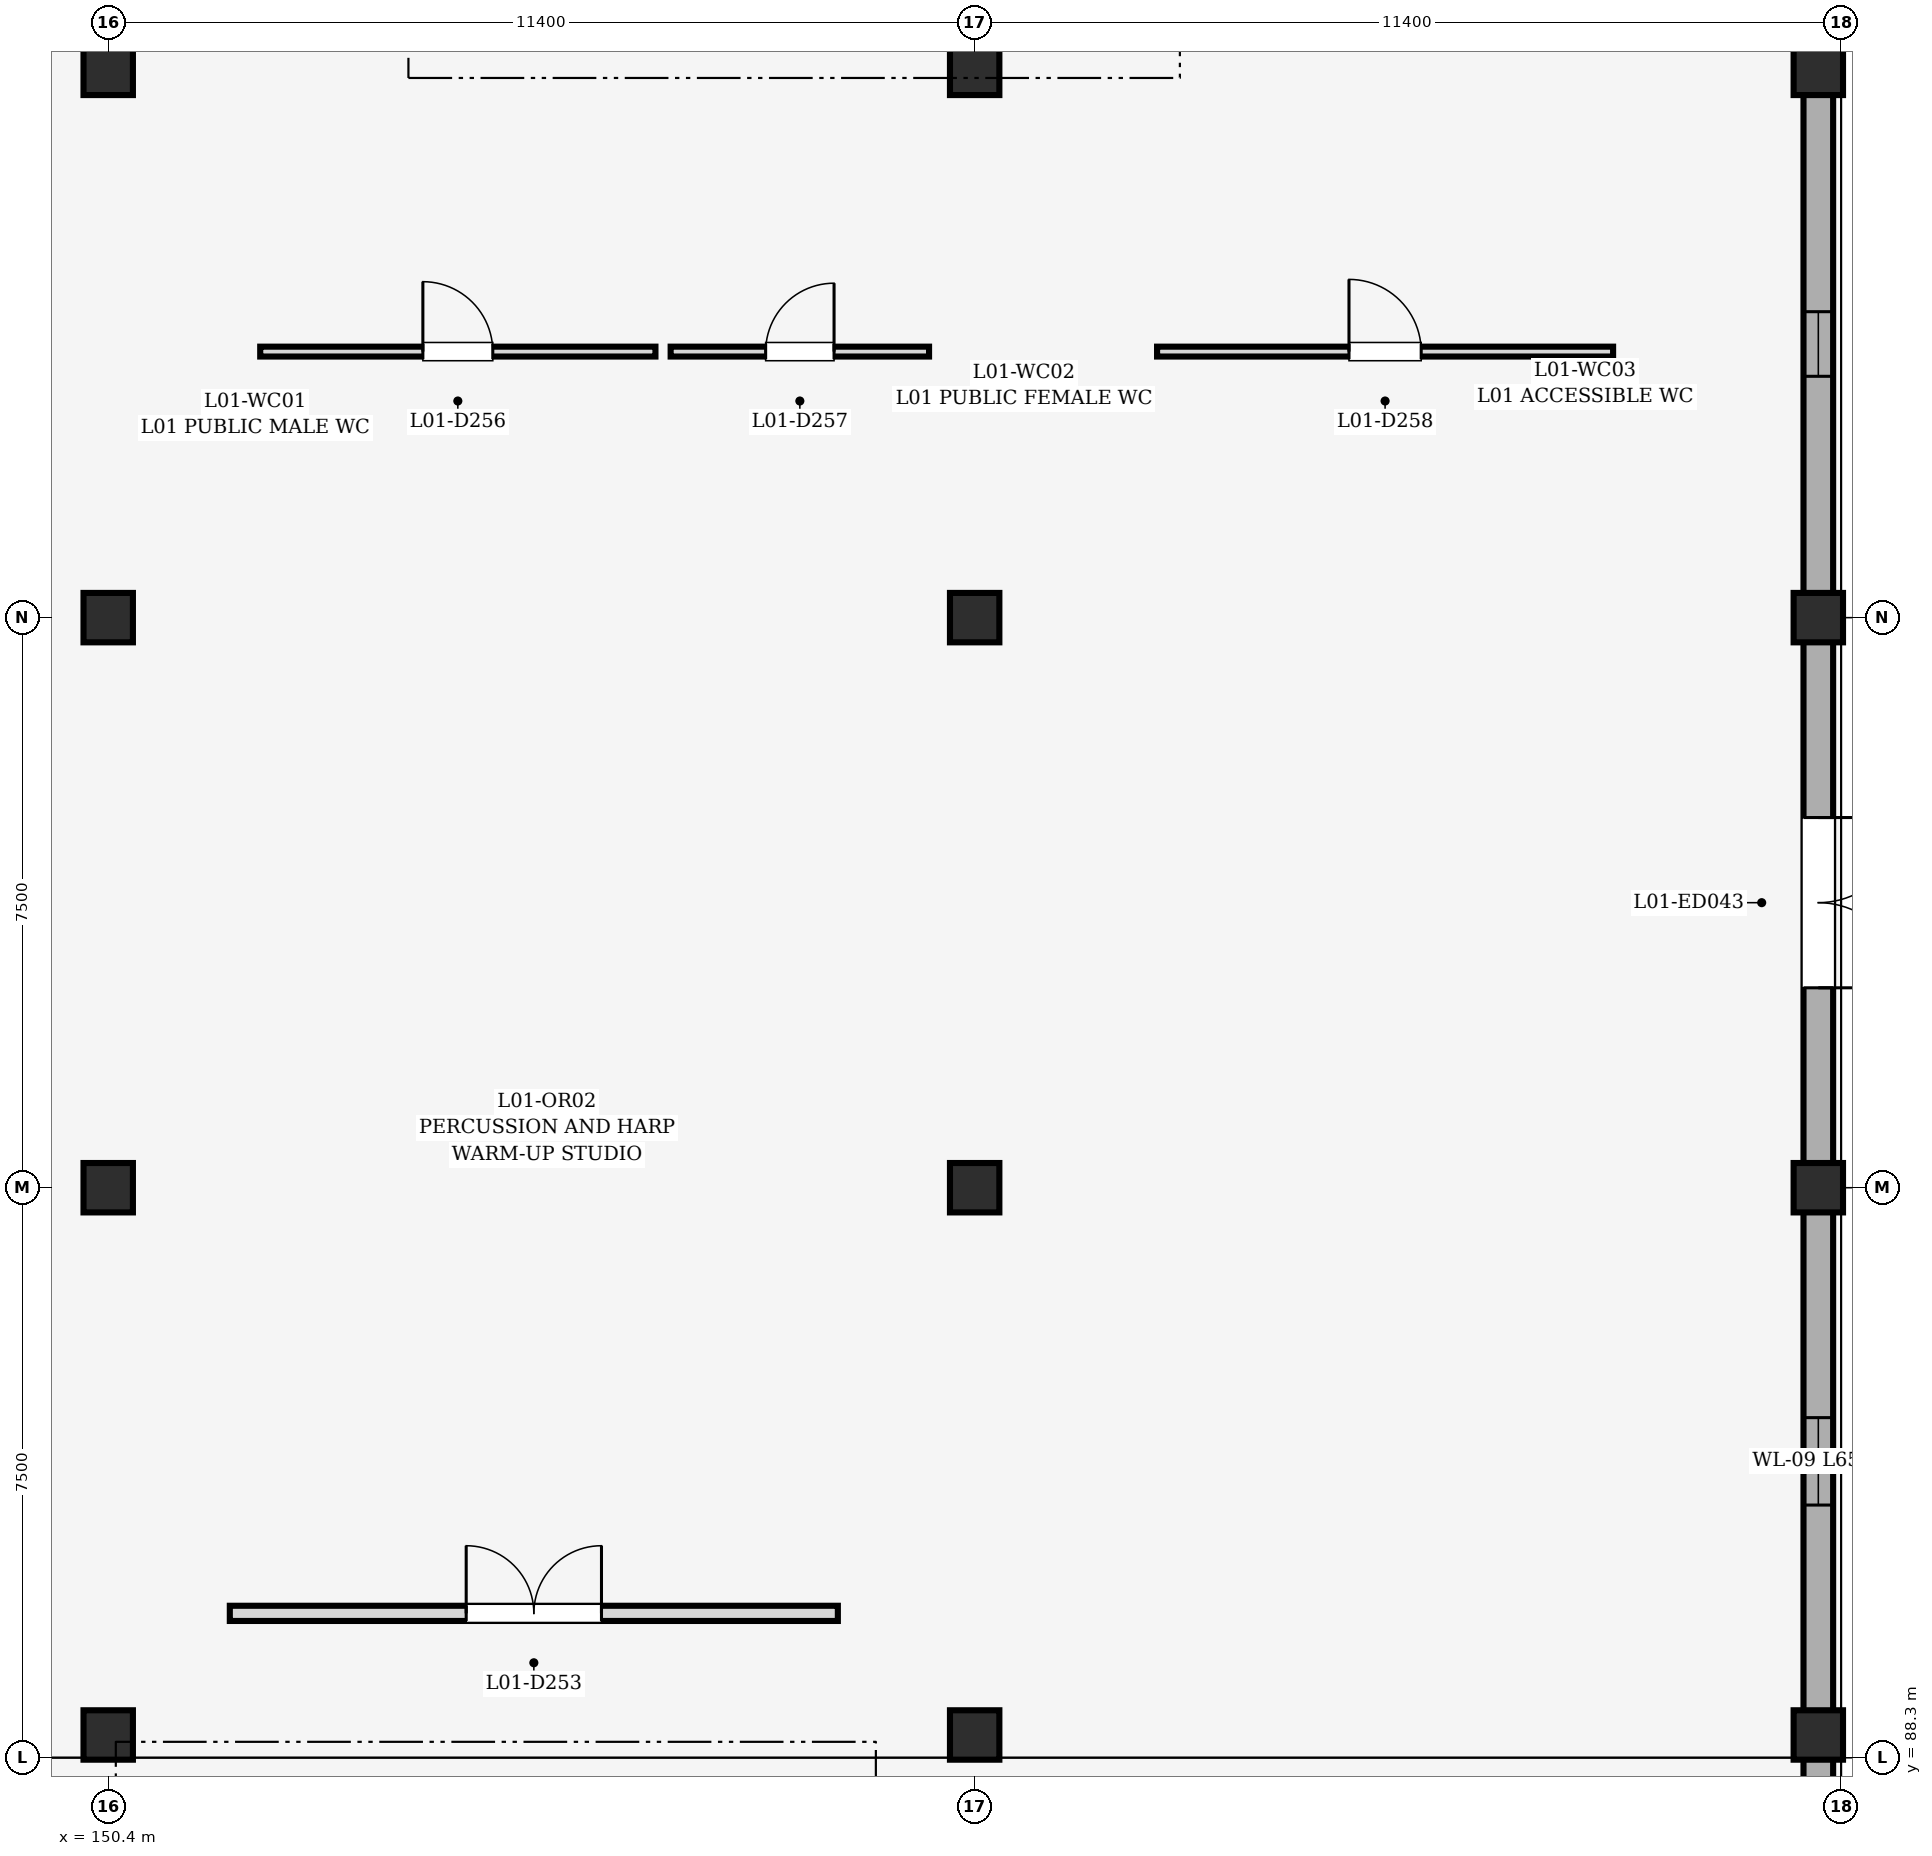
"""IFC4 building model, lengths in metres.
Left out: names, types, materials, properties, quantities, classifications, styles, units other than length and angle.
Written with IfcOpenShell. Run it as: python <this file> out.ifc"""

import sys

from ifc_helpers import new_model, si_unit, direction, frame, frame_2d, origin, origin_2d, place, context, subcontext, project, spatial, rectangle, extrude, element, fill, save


model = new_model("IFC4")
c1 = context("Model", 3, precision=1e-05, world=origin(), true_north=direction((0.0, 1.0)))
c2 = subcontext(c1, "Body", "Model", "MODEL_VIEW")
j1 = project(units=[si_unit("LENGTHUNIT", "METRE"), si_unit("PLANEANGLEUNIT", "RADIAN")], contexts=[c1])
p1 = place(None, origin())
s1 = spatial("IfcSite", under=j1, at=p1, CompositionType="ELEMENT")
p2 = place(p1, origin())
s2 = spatial("IfcBuilding", under=s1, at=p2, CompositionType="ELEMENT")
p3 = place(p2, origin())
s3 = spatial("IfcBuildingStorey", under=s2, at=p3, CompositionType="ELEMENT", Elevation=0.0)
for number, where, z_axis, x_axis in (
    (1, (150.4, 88.6, 0.0), (0.0, 0.0, 1.0), (1.0, 0.0, 0.0)),
    (2, (150.4, 95.8, 0.0), (0.0, 0.0, 1.0), (1.0, 0.0, 0.0)),
    (3, (150.4, 103.3, 0.0), (0.0, 0.0, 1.0), (1.0, 0.0, 0.0)),
    (4, (150.4, 110.5, 0.0), (0.0, 0.0, 1.0), (1.0, 0.0, 0.0)),
    (5, (161.8, 88.6, 0.0), (0.0, 0.0, 1.0), (1.0, 0.0, 0.0)),
    (6, (161.8, 95.8, 0.0), (0.0, 0.0, 1.0), (1.0, 0.0, 0.0)),
    (7, (161.8, 103.3, 0.0), (0.0, 0.0, 1.0), (1.0, 0.0, 0.0)),
    (8, (161.8, 110.5, 0.0), (0.0, 0.0, 1.0), (1.0, 0.0, 0.0)),
    (9, (172.9, 88.6, 0.0), (0.0, 0.0, 1.0), (1.0, 0.0, 0.0)),
    (10, (172.9, 95.8, 0.0), (0.0, 0.0, 1.0), (1.0, 0.0, 0.0)),
    (11, (172.9, 103.3, 0.0), (0.0, 0.0, 1.0), (1.0, 0.0, 0.0)),
    (12, (172.9, 110.5, 0.0), (0.0, 0.0, 1.0), (1.0, 0.0, 0.0)),
):
    element("IfcColumn", number, at=place(p3, frame(where, z_axis=z_axis, x_axis=x_axis)), inside=s3, PredefinedType="COLUMN", context=c2, shape_type="SweptSolid", body=[
        extrude(rectangle(XDim=0.65, YDim=0.65, at=origin_2d()), origin(), (0.0, 0.0, 1.0), 5.4),
    ])
p4 = place(p3, frame((172.9, 95.49, 0.0), z_axis=(0.0, 0.0, 1.0), x_axis=(0.0, -1.0, 0.0)))
e13 = element("IfcWall", 13, at=p4, inside=s3, PredefinedType="STANDARD", context=c2, shape_type="SweptSolid", body=[
    extrude(rectangle(XDim=6.58, YDim=0.39, at=frame_2d((3.29, 0.0))), origin(), (0.0, 0.0, 1.0), 4.6),
])
p5 = place(p4, frame((2.715, 0.0, 0.85)))
e14 = element("IfcOpeningElement", 14, at=p5, cuts=e13, PredefinedType="OPENING", context=c2, shape_type="SweptSolid", body=[
    extrude(rectangle(XDim=1.15, YDim=2.2, at=frame_2d((0.575, 1.1))), frame((0.0, 0.207, 0.0), z_axis=(0.0, -1.0, 0.0), x_axis=(1.0, 0.0, 0.0)), (0.0, 0.0, 1.0), 0.414),
])
p6 = place(p3, frame((172.9, 102.99, 0.0), z_axis=(0.0, 0.0, 1.0), x_axis=(0.0, -1.0, 0.0)))
e15 = element("IfcWall", 15, at=p6, inside=s3, PredefinedType="STANDARD", context=c2, shape_type="SweptSolid", body=[
    extrude(rectangle(XDim=6.88, YDim=0.39, at=frame_2d((3.44, 0.0))), origin(), (0.0, 0.0, 1.0), 4.357),
])
p7 = place(p6, frame((2.32, 0.0, 0.0)))
e16 = element("IfcOpeningElement", 16, at=p7, cuts=e15, PredefinedType="OPENING", context=c2, shape_type="SweptSolid", body=[
    extrude(rectangle(XDim=2.24, YDim=2.35, at=frame_2d((1.12, 1.175))), frame((0.0, 0.207, 0.0), z_axis=(0.0, -1.0, 0.0), x_axis=(1.0, 0.0, 0.0)), (0.0, 0.0, 1.0), 0.414),
])
p8 = place(p3, frame((172.9, 110.19, 0.0), z_axis=(0.0, 0.0, 1.0), x_axis=(0.0, -1.0, 0.0)))
e17 = element("IfcWall", 17, at=p8, inside=s3, PredefinedType="STANDARD", context=c2, shape_type="SweptSolid", body=[
    extrude(rectangle(XDim=6.58, YDim=0.39, at=frame_2d((3.29, 0.0))), origin(), (0.0, 0.0, 1.0), 4.407),
])
p9 = place(p8, frame((2.865, 0.0, 0.85)))
e18 = element("IfcOpeningElement", 18, at=p9, cuts=e17, PredefinedType="OPENING", context=c2, shape_type="SweptSolid", body=[
    extrude(rectangle(XDim=0.85, YDim=1.95, at=frame_2d((0.425, 0.975))), frame((0.0, 0.207, 0.0), z_axis=(0.0, -1.0, 0.0), x_axis=(1.0, 0.0, 0.0)), (0.0, 0.0, 1.0), 0.414),
])
p10 = place(p3, frame((172.9, 88.29, 0.0), z_axis=(0.0, 0.0, 1.0), x_axis=(0.0, -1.0, 0.0)))
e19 = element("IfcWall", 19, at=p10, inside=s3, PredefinedType="STANDARD", context=c2, shape_type="SweptSolid", body=[
    extrude(rectangle(XDim=7.205, YDim=0.39, at=frame_2d((3.603, 0.0))), origin(), (0.0, 0.0, 1.0), 4.579),
])
p11 = place(p10, frame((2.482, 0.0, 0.0)))
e20 = element("IfcOpeningElement", 20, at=p11, cuts=e19, PredefinedType="OPENING", context=c2, shape_type="SweptSolid", body=[
    extrude(rectangle(XDim=2.24, YDim=2.35, at=frame_2d((1.12, 1.175))), frame((0.0, 0.207, 0.0), z_axis=(0.0, -1.0, 0.0), x_axis=(1.0, 0.0, 0.0)), (0.0, 0.0, 1.0), 0.414),
])
p12 = place(p3, frame((152.0, 90.2, 0.0), z_axis=(0.0, 0.0, 1.0), x_axis=(1.0, 0.0, 0.0)))
e21 = element("IfcWall", 21, at=p12, inside=s3, PredefinedType="PARTITIONING", context=c2, shape_type="SweptSolid", body=[
    extrude(rectangle(XDim=8.0, YDim=0.2, at=frame_2d((4.0, 0.0))), origin(), (0.0, 0.0, 1.0), 5.105),
])
p13 = place(p12, frame((3.11, 0.0, 0.0)))
e22 = element("IfcOpeningElement", 22, at=p13, cuts=e21, PredefinedType="OPENING", context=c2, shape_type="SweptSolid", body=[
    extrude(rectangle(XDim=1.78, YDim=2.28, at=frame_2d((0.89, 1.14))), frame((0.0, 0.112, 0.0), z_axis=(0.0, -1.0, 0.0), x_axis=(1.0, 0.0, 0.0)), (0.0, 0.0, 1.0), 0.224),
])
p14 = place(p3, frame((152.4, 106.8, 0.0), z_axis=(0.0, 0.0, 1.0), x_axis=(1.0, 0.0, 0.0)))
e23 = element("IfcWall", 23, at=p14, inside=s3, PredefinedType="PARTITIONING", context=c2, shape_type="SweptSolid", body=[
    extrude(rectangle(XDim=5.2, YDim=0.13, at=frame_2d((2.6, 0.0))), origin(), (0.0, 0.0, 1.0), 4.704),
])
p15 = place(p14, frame((2.14, 0.0, 0.0)))
e24 = element("IfcOpeningElement", 24, at=p15, cuts=e23, PredefinedType="OPENING", context=c2, shape_type="SweptSolid", body=[
    extrude(rectangle(XDim=0.92, YDim=2.1, at=frame_2d((0.46, 1.05))), frame((0.0, 0.077, 0.0), z_axis=(0.0, -1.0, 0.0), x_axis=(1.0, 0.0, 0.0)), (0.0, 0.0, 1.0), 0.154),
])
p16 = place(p3, frame((157.8, 106.8, 0.0), z_axis=(0.0, 0.0, 1.0), x_axis=(1.0, 0.0, 0.0)))
e25 = element("IfcWall", 25, at=p16, inside=s3, PredefinedType="PARTITIONING", context=c2, shape_type="SweptSolid", body=[
    extrude(rectangle(XDim=3.4, YDim=0.13, at=frame_2d((1.7, 0.0))), origin(), (0.0, 0.0, 1.0), 4.704),
])
p17 = place(p16, frame((1.25, 0.0, 0.0)))
e26 = element("IfcOpeningElement", 26, at=p17, cuts=e25, PredefinedType="OPENING", context=c2, shape_type="SweptSolid", body=[
    extrude(rectangle(XDim=0.9, YDim=2.1, at=frame_2d((0.45, 1.05))), frame((0.0, 0.077, 0.0), z_axis=(0.0, -1.0, 0.0), x_axis=(1.0, 0.0, 0.0)), (0.0, 0.0, 1.0), 0.154),
])
p18 = place(p3, frame((164.2, 106.8, 0.0), z_axis=(0.0, 0.0, 1.0), x_axis=(1.0, 0.0, 0.0)))
e27 = element("IfcWall", 27, at=p18, inside=s3, PredefinedType="PARTITIONING", context=c2, shape_type="SweptSolid", body=[
    extrude(rectangle(XDim=6.0, YDim=0.13, at=frame_2d((3.0, 0.0))), origin(), (0.0, 0.0, 1.0), 4.704),
])
p19 = place(p18, frame((2.525, 0.0, 0.0)))
e28 = element("IfcOpeningElement", 28, at=p19, cuts=e27, PredefinedType="OPENING", context=c2, shape_type="SweptSolid", body=[
    extrude(rectangle(XDim=0.95, YDim=2.15, at=frame_2d((0.475, 1.075))), frame((0.0, 0.077, 0.0), z_axis=(0.0, -1.0, 0.0), x_axis=(1.0, 0.0, 0.0)), (0.0, 0.0, 1.0), 0.154),
])
p20 = place(p5, origin())
e29 = element("IfcWindow", 29, at=p20, inside=s3, PartitioningType="DOUBLE_PANEL_VERTICAL", PredefinedType="WINDOW", context=c2, shape_type="SweptSolid", body=[
    extrude(rectangle(XDim=1.15, YDim=2.2, at=frame_2d((0.575, 1.1))), frame((0.0, 0.03, 0.0), z_axis=(0.0, -1.0, 0.0), x_axis=(1.0, 0.0, 0.0)), (0.0, 0.0, 1.0), 0.06),
])
fill(e14, e29)
p21 = place(p7, origin())
e30 = element("IfcDoor", 30, at=p21, inside=s3, OperationType="DOUBLE_DOOR_SINGLE_SWING", PredefinedType="DOOR", context=c2, shape_type="SweptSolid", body=[
    extrude(rectangle(XDim=2.24, YDim=2.35, at=frame_2d((1.12, 1.175))), frame((0.0, 0.025, 0.0), z_axis=(0.0, -1.0, 0.0), x_axis=(1.0, 0.0, 0.0)), (0.0, 0.0, 1.0), 0.05),
])
fill(e16, e30)
p22 = place(p9, origin())
e31 = element("IfcWindow", 31, at=p22, inside=s3, PartitioningType="DOUBLE_PANEL_VERTICAL", PredefinedType="WINDOW", context=c2, shape_type="SweptSolid", body=[
    extrude(rectangle(XDim=0.85, YDim=1.95, at=frame_2d((0.425, 0.975))), frame((0.0, 0.03, 0.0), z_axis=(0.0, -1.0, 0.0), x_axis=(1.0, 0.0, 0.0)), (0.0, 0.0, 1.0), 0.06),
])
fill(e18, e31)
p23 = place(p13, origin())
e32 = element("IfcDoor", 32, at=p23, inside=s3, OperationType="DOUBLE_DOOR_SINGLE_SWING", PredefinedType="DOOR", context=c2, shape_type="SweptSolid", body=[
    extrude(rectangle(XDim=1.78, YDim=2.28, at=frame_2d((0.89, 1.14))), frame((0.0, 0.025, 0.0), z_axis=(0.0, -1.0, 0.0), x_axis=(1.0, 0.0, 0.0)), (0.0, 0.0, 1.0), 0.05),
])
fill(e22, e32)
p24 = place(p15, origin())
e33 = element("IfcDoor", 33, at=p24, inside=s3, OperationType="SINGLE_SWING_LEFT", PredefinedType="DOOR", context=c2, shape_type="SweptSolid", body=[
    extrude(rectangle(XDim=0.92, YDim=2.1, at=frame_2d((0.46, 1.05))), frame((0.0, 0.025, 0.0), z_axis=(0.0, -1.0, 0.0), x_axis=(1.0, 0.0, 0.0)), (0.0, 0.0, 1.0), 0.05),
])
fill(e24, e33)
p25 = place(p17, origin())
e34 = element("IfcDoor", 34, at=p25, inside=s3, OperationType="SINGLE_SWING_RIGHT", PredefinedType="DOOR", context=c2, shape_type="SweptSolid", body=[
    extrude(rectangle(XDim=0.9, YDim=2.1, at=frame_2d((0.45, 1.05))), frame((0.0, 0.025, 0.0), z_axis=(0.0, -1.0, 0.0), x_axis=(1.0, 0.0, 0.0)), (0.0, 0.0, 1.0), 0.05),
])
fill(e26, e34)
p26 = place(p19, origin())
e35 = element("IfcDoor", 35, at=p26, inside=s3, OperationType="SINGLE_SWING_LEFT", PredefinedType="DOOR", context=c2, shape_type="SweptSolid", body=[
    extrude(rectangle(XDim=0.95, YDim=2.15, at=frame_2d((0.475, 1.075))), frame((0.0, 0.025, 0.0), z_axis=(0.0, -1.0, 0.0), x_axis=(1.0, 0.0, 0.0)), (0.0, 0.0, 1.0), 0.05),
])
fill(e28, e35)
save(model, sys.argv[1])
